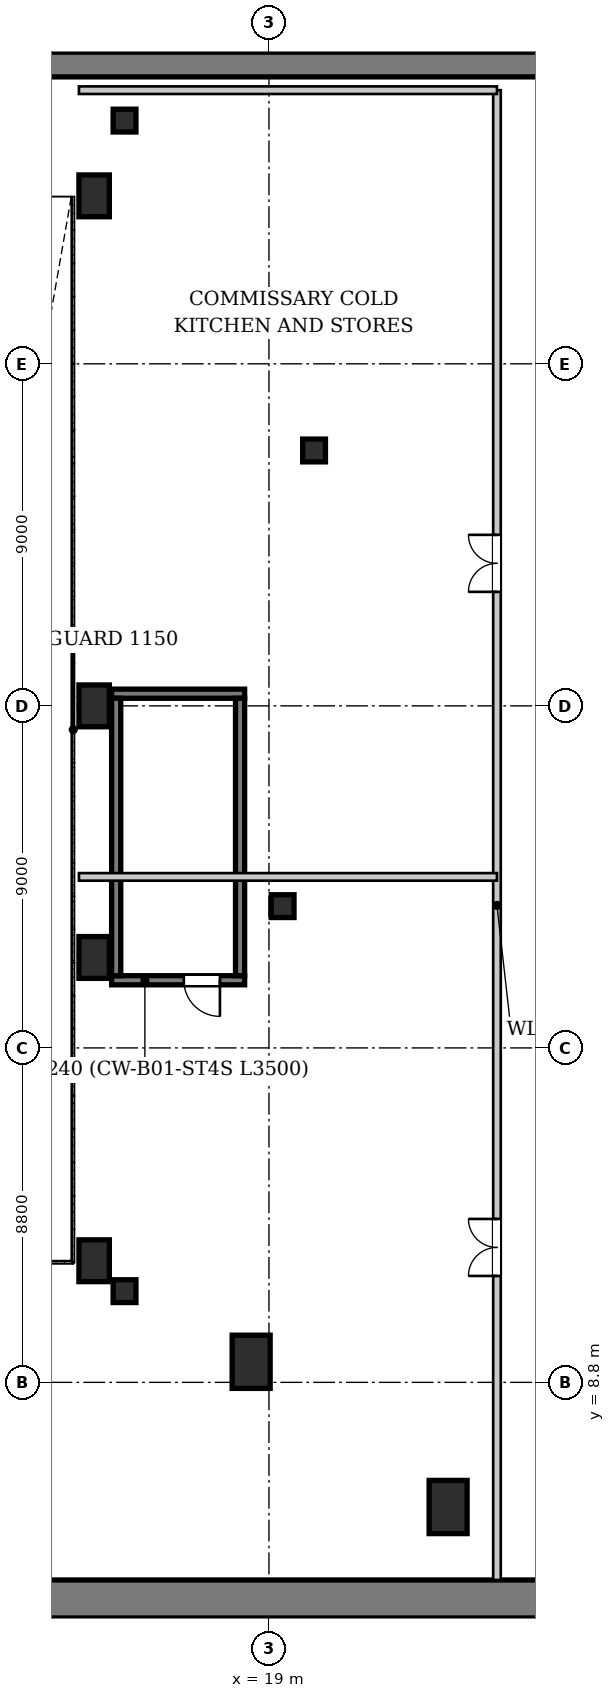
"""IFC4 building model, lengths in metres.
Left out: names, types, materials, properties, quantities, classifications, styles, units other than length and angle.
Written with IfcOpenShell. Run it as: python <this file> out.ifc"""

import sys

from ifc_helpers import new_model, si_unit, direction, frame, frame_2d, origin, origin_2d, place, context, subcontext, project, spatial, rectangle, hollow_rectangle, extrude, source, transform, mapped, element, fill, save


model = new_model("IFC4")
c1 = context("Model", 3, precision=1e-05, world=origin(), true_north=direction((0.0, 1.0)))
c2 = subcontext(c1, "Body", "Model", "MODEL_VIEW")
j1 = project(units=[si_unit("LENGTHUNIT", "METRE"), si_unit("PLANEANGLEUNIT", "RADIAN")], contexts=[c1])
p1 = place(None, origin())
s1 = spatial("IfcSite", under=j1, at=p1, CompositionType="ELEMENT")
p2 = place(p1, origin())
s2 = spatial("IfcBuilding", under=s1, at=p2, CompositionType="ELEMENT")
p3 = place(p2, frame((0.0, 0.0, -4.8)))
s3 = spatial("IfcBuildingStorey", under=s2, at=p3, CompositionType="ELEMENT", Elevation=-4.8)
p4 = place(p3, frame((2.0, 3.1, 0.0), z_axis=(0.0, 0.0, 1.0), x_axis=(1.0, 0.0, 0.0)))
e1 = element("IfcWall", 1, at=p4, inside=s3, PredefinedType="SOLIDWALL", context=c2, shape_type="SweptSolid", body=[
    extrude(rectangle(XDim=72.0, YDim=1.0, at=frame_2d((36.0, 0.0))), origin(), (0.0, 0.0, 1.0), 4.48),
])
p5 = place(p3, frame((10.0, 43.475, 0.0), z_axis=(0.0, 0.0, 1.0), x_axis=(1.0, 0.0, 0.0)))
e2 = element("IfcWall", 2, at=p5, inside=s3, PredefinedType="SOLIDWALL", context=c2, shape_type="SweptSolid", body=[
    extrude(rectangle(XDim=61.0, YDim=0.65, at=frame_2d((30.5, 0.0))), origin(), (0.0, 0.0, 1.0), 4.48),
])
m1 = source(origin(), c2, "Body", "SweptSolid", [
    extrude(rectangle(XDim=1.0, YDim=1.4, at=origin_2d()), origin(), (0.0, 0.0, 1.0), 4.635),
])
for number, where, z_axis, x_axis in (
    (3, (18.532, 9.341, 0.0), (0.0, 0.0, 1.0), (1.0, 0.0, 0.0)),
    (4, (23.714, 5.52, 0.0), (0.0, 0.0, 1.0), (1.0, 0.0, 0.0)),
):
    element("IfcColumn", number, at=place(p3, frame(where, z_axis=z_axis, x_axis=x_axis)), inside=s3, PredefinedType="COLUMN", context=c2, shape_type="MappedRepresentation", body=[
        mapped(m1, transform((0.0, 0.0, 0.0), x_axis=(1.0, 0.0, 0.0), y_axis=(0.0, 1.0, 0.0), z_axis=(0.0, 0.0, 1.0), scale=1.0)),
    ])
m2 = source(origin(), c2, "Body", "SweptSolid", [
    extrude(hollow_rectangle(XDim=0.6, YDim=0.6, WallThickness=0.035, at=origin_2d()), origin(), (0.0, 0.0, 1.0), 4.635),
])
for number, where, z_axis, x_axis in (
    (5, (15.2, 11.2, 0.0), (0.0, 0.0, 1.0), (1.0, 0.0, 0.0)),
    (6, (15.2, 42.0, 0.0), (0.0, 0.0, 1.0), (1.0, 0.0, 0.0)),
):
    element("IfcColumn", number, at=place(p3, frame(where, z_axis=z_axis, x_axis=x_axis)), inside=s3, PredefinedType="COLUMN", context=c2, shape_type="MappedRepresentation", body=[
        mapped(m2, transform((0.0, 0.0, 0.0), x_axis=(1.0, 0.0, 0.0), y_axis=(0.0, 1.0, 0.0), z_axis=(0.0, 0.0, 1.0), scale=1.0)),
    ])
m3 = source(origin(), c2, "Body", "SweptSolid", [
    extrude(rectangle(XDim=0.8, YDim=1.1, at=origin_2d()), origin(), (0.0, 0.0, 1.0), 4.635),
])
for number, where, z_axis, x_axis in (
    (7, (14.4, 12.0, 0.0), (0.0, 0.0, 1.0), (1.0, 0.0, 0.0)),
    (8, (14.4, 19.98, 0.0), (0.0, 0.0, 1.0), (1.0, 0.0, 0.0)),
    (9, (14.4, 26.6, 0.0), (0.0, 0.0, 1.0), (1.0, 0.0, 0.0)),
    (10, (14.4, 40.02, 0.0), (0.0, 0.0, 1.0), (1.0, 0.0, 0.0)),
):
    element("IfcColumn", number, at=place(p3, frame(where, z_axis=z_axis, x_axis=x_axis)), inside=s3, PredefinedType="COLUMN", context=c2, shape_type="MappedRepresentation", body=[
        mapped(m3, transform((0.0, 0.0, 0.0), x_axis=(1.0, 0.0, 0.0), y_axis=(0.0, 1.0, 0.0), z_axis=(0.0, 0.0, 1.0), scale=1.0)),
    ])
for number, where, z_axis, x_axis in (
    (11, (20.187, 33.32, 0.0), (0.0, 0.0, 1.0), (1.0, 0.0, 0.0)),
    (12, (19.359, 21.331, 0.0), (0.0, 0.0, 1.0), (1.0, 0.0, 0.0)),
):
    element("IfcColumn", number, at=place(p3, frame(where, z_axis=z_axis, x_axis=x_axis)), inside=s3, PredefinedType="COLUMN", context=c2, shape_type="MappedRepresentation", body=[
        mapped(m2, transform((0.0, 0.0, 0.0), x_axis=(1.0, 0.0, 0.0), y_axis=(0.0, 1.0, 0.0), z_axis=(0.0, 0.0, 1.0), scale=1.0)),
    ])
p6 = place(p3, frame((18.36, 19.38, 0.0), z_axis=(0.0, 0.0, 1.0), x_axis=(-1.0, 0.0, 0.0)))
e13 = element("IfcWall", 13, at=p6, inside=s3, PredefinedType="PARTITIONING", context=c2, shape_type="SweptSolid", body=[
    extrude(rectangle(XDim=3.5, YDim=0.24, at=frame_2d((1.75, 0.0))), origin(), (0.0, 0.0, 1.0), 4.48),
])
p7 = place(p6, frame((0.65, 0.0, 0.0)))
e14 = element("IfcOpeningElement", 14, at=p7, cuts=e13, PredefinedType="OPENING", context=c2, shape_type="SweptSolid", body=[
    extrude(rectangle(XDim=0.95, YDim=2.1, at=frame_2d((0.475, 1.05))), frame((0.0, 0.13, 0.0), z_axis=(0.0, -1.0, 0.0), x_axis=(1.0, 0.0, 0.0)), (0.0, 0.0, 1.0), 0.26),
])
p8 = place(p3, frame((14.86, 26.92, 0.0), z_axis=(0.0, 0.0, 1.0), x_axis=(1.0, 0.0, 0.0)))
e15 = element("IfcWall", 15, at=p8, inside=s3, PredefinedType="PARTITIONING", context=c2, shape_type="SweptSolid", body=[
    extrude(rectangle(XDim=3.5, YDim=0.24, at=frame_2d((1.75, 0.0))), origin(), (0.0, 0.0, 1.0), 4.48),
])
for number, where, z_axis, x_axis in (
    (16, (14.98, 19.5, 0.0), (0.0, 0.0, 1.0), (0.0, 1.0, 0.0)),
    (17, (18.24, 26.8, 0.0), (0.0, 0.0, 1.0), (0.0, -1.0, 0.0)),
):
    element("IfcWall", number, at=place(p3, frame(where, z_axis=z_axis, x_axis=x_axis)), inside=s3, PredefinedType="PARTITIONING", context=c2, shape_type="SweptSolid", body=[
        extrude(rectangle(XDim=7.3, YDim=0.24, at=frame_2d((3.65, 0.0))), origin(), (0.0, 0.0, 1.0), 4.48),
    ])
p9 = place(p3, frame((25.0, 3.6, 0.0), z_axis=(0.0, 0.0, 1.0), x_axis=(0.0, 1.0, 0.0)))
e18 = element("IfcWall", 18, at=p9, inside=s3, PredefinedType="PARTITIONING", context=c2, shape_type="SweptSolid", body=[
    extrude(rectangle(XDim=39.2, YDim=0.2, at=frame_2d((19.6, 0.0))), origin(), (0.0, 0.0, 1.0), 4.48),
])
p10 = place(p9, frame((8.0, 0.0, 0.0)))
e19 = element("IfcOpeningElement", 19, at=p10, cuts=e18, PredefinedType="OPENING", context=c2, shape_type="SweptSolid", body=[
    extrude(rectangle(XDim=1.5, YDim=2.25, at=frame_2d((0.75, 1.125))), frame((0.0, 0.11, 0.0), z_axis=(0.0, -1.0, 0.0), x_axis=(1.0, 0.0, 0.0)), (0.0, 0.0, 1.0), 0.22),
])
p11 = place(p9, frame((26.0, 0.0, 0.0)))
e20 = element("IfcOpeningElement", 20, at=p11, cuts=e18, PredefinedType="OPENING", context=c2, shape_type="SweptSolid", body=[
    extrude(rectangle(XDim=1.5, YDim=2.25, at=frame_2d((0.75, 1.125))), frame((0.0, 0.11, 0.0), z_axis=(0.0, -1.0, 0.0), x_axis=(1.0, 0.0, 0.0)), (0.0, 0.0, 1.0), 0.22),
])
for number, where, z_axis, x_axis in (
    (21, (14.0, 22.1, 0.0), (0.0, 0.0, 1.0), (1.0, 0.0, 0.0)),
    (22, (14.0, 42.8, 0.0), (0.0, 0.0, 1.0), (1.0, 0.0, 0.0)),
):
    element("IfcWall", number, at=place(p3, frame(where, z_axis=z_axis, x_axis=x_axis)), inside=s3, PredefinedType="PARTITIONING", context=c2, shape_type="SweptSolid", body=[
        extrude(rectangle(XDim=11.0, YDim=0.2, at=frame_2d((5.5, 0.0))), origin(), (0.0, 0.0, 1.0), 4.48),
    ])
m4 = source(origin(), c2, "Body", "SweptSolid", [
    extrude(rectangle(XDim=0.95, YDim=2.1, at=frame_2d((0.475, 1.05))), frame((0.0, 0.025, 0.0), z_axis=(0.0, -1.0, 0.0), x_axis=(1.0, 0.0, 0.0)), (0.0, 0.0, 1.0), 0.05),
])
p12 = place(p7, origin())
e23 = element("IfcDoor", 23, at=p12, inside=s3, OperationType="SINGLE_SWING_LEFT", PredefinedType="DOOR", context=c2, shape_type="MappedRepresentation", body=[
    mapped(m4, transform((0.0, 0.0, 0.0), x_axis=(1.0, 0.0, 0.0), y_axis=(0.0, 1.0, 0.0), z_axis=(0.0, 0.0, 1.0), scale=1.0)),
])
fill(e14, e23)
m5 = source(origin(), c2, "Body", "SweptSolid", [
    extrude(rectangle(XDim=1.5, YDim=2.25, at=frame_2d((0.75, 1.125))), frame((0.0, 0.025, 0.0), z_axis=(0.0, -1.0, 0.0), x_axis=(1.0, 0.0, 0.0)), (0.0, 0.0, 1.0), 0.05),
])
p13 = place(p10, origin())
e24 = element("IfcDoor", 24, at=p13, inside=s3, OperationType="DOUBLE_DOOR_SINGLE_SWING", PredefinedType="DOOR", context=c2, shape_type="MappedRepresentation", body=[
    mapped(m5, transform((0.0, 0.0, 0.0), x_axis=(1.0, 0.0, 0.0), y_axis=(0.0, 1.0, 0.0), z_axis=(0.0, 0.0, 1.0), scale=1.0)),
])
fill(e19, e24)
p14 = place(p11, origin())
e25 = element("IfcDoor", 25, at=p14, inside=s3, OperationType="DOUBLE_DOOR_SINGLE_SWING", PredefinedType="DOOR", context=c2, shape_type="MappedRepresentation", body=[
    mapped(m5, transform((0.0, 0.0, 0.0), x_axis=(1.0, 0.0, 0.0), y_axis=(0.0, 1.0, 0.0), z_axis=(0.0, 0.0, 1.0), scale=1.0)),
])
fill(e20, e25)
save(model, sys.argv[1])
